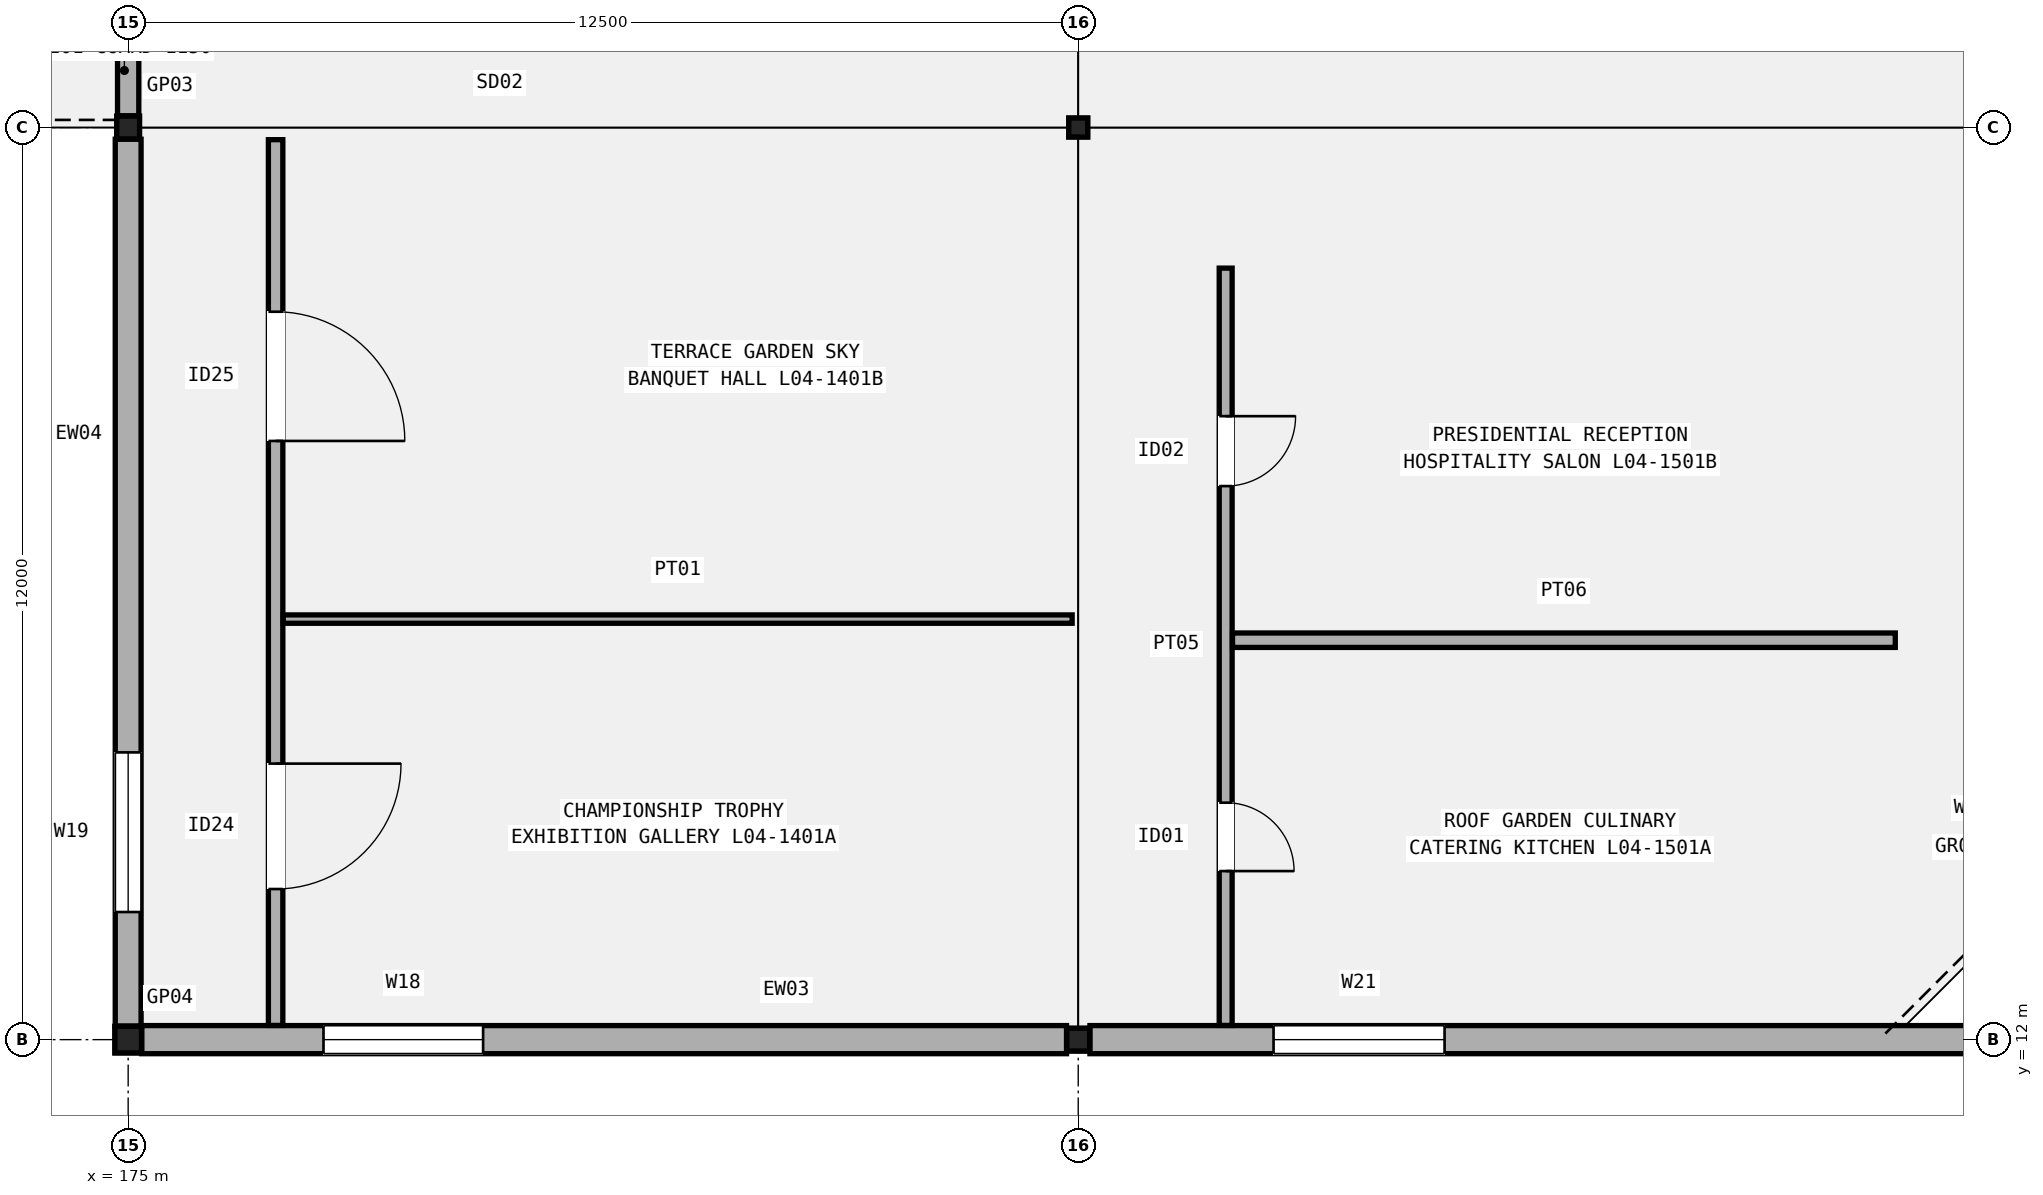
"""IFC4 building model, lengths in metres.
Left out: names, types, materials, properties, quantities, classifications, styles, units other than length and angle.
Written with IfcOpenShell. Run it as: python <this file> out.ifc"""

import sys

from ifc_helpers import new_model, si_unit, direction, frame, frame_2d, origin, origin_2d, place, context, subcontext, project, spatial, rectangle, hollow_rectangle, extrude, element, fill, save


model = new_model("IFC4")
c1 = context("Model", 3, precision=1e-05, world=origin(), true_north=direction((0.0, 1.0)))
c2 = subcontext(c1, "Body", "Model", "MODEL_VIEW")
j1 = project(units=[si_unit("LENGTHUNIT", "METRE"), si_unit("PLANEANGLEUNIT", "RADIAN")], contexts=[c1])
p1 = place(None, origin())
s1 = spatial("IfcSite", under=j1, at=p1, CompositionType="ELEMENT")
p2 = place(p1, origin())
s2 = spatial("IfcBuilding", under=s1, at=p2, CompositionType="ELEMENT")
p3 = place(p2, frame((0.0, 0.0, 20.4)))
s3 = spatial("IfcBuildingStorey", under=s2, at=p3, CompositionType="ELEMENT", Elevation=20.4)
p4 = place(p3, frame((175.0, 12.0, 0.0), z_axis=(0.0, 0.0, 1.0), x_axis=(1.0, 0.0, 0.0)))
e1 = element("IfcColumn", 1, at=p4, inside=s3, PredefinedType="COLUMN", context=c2, shape_type="SweptSolid", body=[
    extrude(hollow_rectangle(XDim=0.35, YDim=0.35, WallThickness=0.016, InnerFilletRadius=0.016, OuterFilletRadius=0.032, at=origin_2d()), origin(), (0.0, 0.0, 1.0), 5.4),
])
for number, where, z_axis, x_axis in (
    (2, (175.0, 24.0, 0.0), (0.0, 0.0, 1.0), (1.0, 0.0, 0.0)),
    (3, (187.5, 12.0, 0.0), (0.0, 0.0, 1.0), (1.0, 0.0, 0.0)),
):
    element("IfcColumn", number, at=place(p3, frame(where, z_axis=z_axis, x_axis=x_axis)), inside=s3, PredefinedType="COLUMN", context=c2, shape_type="SweptSolid", body=[
        extrude(hollow_rectangle(XDim=0.3, YDim=0.3, WallThickness=0.012, InnerFilletRadius=0.012, OuterFilletRadius=0.024, at=origin_2d()), origin(), (0.0, 0.0, 1.0), 5.4),
    ])
p5 = place(p3, frame((187.5, 24.0, 0.0), z_axis=(0.0, 0.0, 1.0), x_axis=(1.0, 0.0, 0.0)))
e4 = element("IfcColumn", 4, at=p5, inside=s3, PredefinedType="COLUMN", context=c2, shape_type="SweptSolid", body=[
    extrude(hollow_rectangle(XDim=0.25, YDim=0.25, WallThickness=0.012, InnerFilletRadius=0.012, OuterFilletRadius=0.024, at=origin_2d()), origin(), (0.0, 0.0, 1.0), 5.4),
])
p6 = place(p3, frame((175.179, 12.0, 0.0), z_axis=(0.0, 0.0, 1.0), x_axis=(1.0, 0.0, 0.0)))
e5 = element("IfcWall", 5, at=p6, inside=s3, PredefinedType="SOLIDWALL", context=c2, shape_type="SweptSolid", body=[
    extrude(rectangle(XDim=12.167, YDim=0.37, at=frame_2d((6.083, 0.0))), origin(), (0.0, 0.0, 1.0), 4.48),
])
p7 = place(p6, frame((2.391, 0.0, 0.95)))
e6 = element("IfcOpeningElement", 6, at=p7, cuts=e5, PredefinedType="OPENING", context=c2, shape_type="SweptSolid", body=[
    extrude(rectangle(XDim=2.1, YDim=1.85, at=frame_2d((1.05, 0.925))), frame((0.0, 0.195, 0.0), z_axis=(0.0, -1.0, 0.0), x_axis=(1.0, 0.0, 0.0)), (0.0, 0.0, 1.0), 0.39),
])
p8 = place(p3, frame((175.0, 12.179, 0.0), z_axis=(0.0, 0.0, 1.0), x_axis=(0.0, 1.0, 0.0)))
e7 = element("IfcWall", 7, at=p8, inside=s3, PredefinedType="SOLIDWALL", context=c2, shape_type="SweptSolid", body=[
    extrude(rectangle(XDim=11.667, YDim=0.34, at=frame_2d((5.833, 0.0))), origin(), (0.0, 0.0, 1.0), 4.48),
])
p9 = place(p8, frame((1.5, 0.0, 0.95)))
e8 = element("IfcOpeningElement", 8, at=p9, cuts=e7, PredefinedType="OPENING", context=c2, shape_type="SweptSolid", body=[
    extrude(rectangle(XDim=2.1, YDim=2.25, at=frame_2d((1.05, 1.125))), frame((0.0, 0.18, 0.0), z_axis=(0.0, -1.0, 0.0), x_axis=(1.0, 0.0, 0.0)), (0.0, 0.0, 1.0), 0.36),
])
p10 = place(p3, frame((175.0, 24.154, 0.0), z_axis=(0.0, 0.0, 1.0), x_axis=(0.0, 1.0, 0.0)))
e9 = element("IfcWall", 9, at=p10, inside=s3, PredefinedType="SOLIDWALL", context=c2, shape_type="SweptSolid", body=[
    extrude(rectangle(XDim=11.717, YDim=0.28, at=frame_2d((5.858, 0.0))), origin(), (0.0, 0.0, 1.0), 4.58),
])
p11 = place(p10, frame((3.366, 0.0, 0.0)))
e10 = element("IfcOpeningElement", 10, at=p11, cuts=e9, PredefinedType="OPENING", context=c2, shape_type="SweptSolid", body=[
    extrude(rectangle(XDim=2.1, YDim=2.35, at=frame_2d((1.05, 1.175))), frame((0.0, 0.15, 0.0), z_axis=(0.0, -1.0, 0.0), x_axis=(1.0, 0.0, 0.0)), (0.0, 0.0, 1.0), 0.3),
])
p12 = place(p3, frame((187.654, 12.0, 0.0), z_axis=(0.0, 0.0, 1.0), x_axis=(1.0, 0.0, 0.0)))
e11 = element("IfcWall", 11, at=p12, inside=s3, PredefinedType="SOLIDWALL", context=c2, shape_type="SweptSolid", body=[
    extrude(rectangle(XDim=12.217, YDim=0.37, at=frame_2d((6.108, 0.0))), origin(), (0.0, 0.0, 1.0), 4.58),
])
p13 = place(p12, frame((2.416, 0.0, 0.95)))
e12 = element("IfcOpeningElement", 12, at=p13, cuts=e11, PredefinedType="OPENING", context=c2, shape_type="SweptSolid", body=[
    extrude(rectangle(XDim=2.25, YDim=1.8, at=frame_2d((1.125, 0.9))), frame((0.0, 0.195, 0.0), z_axis=(0.0, -1.0, 0.0), x_axis=(1.0, 0.0, 0.0)), (0.0, 0.0, 1.0), 0.39),
])
p14 = place(p3, frame((176.94, 12.187, 0.0), z_axis=(0.0, 0.0, 1.0), x_axis=(0.0, 1.0, 0.0)))
e13 = element("IfcWall", 13, at=p14, inside=s3, PredefinedType="PARTITIONING", context=c2, shape_type="SweptSolid", body=[
    extrude(rectangle(XDim=11.653, YDim=0.19, at=frame_2d((5.827, 0.0))), origin(), (0.0, 0.0, 1.0), 4.52),
])
p15 = place(p14, frame((3.444, 0.0, 0.0), z_axis=(0.0, 0.0, 1.0), x_axis=(-1.0, 0.0, 0.0)))
e14 = element("IfcOpeningElement", 14, at=p15, cuts=e13, PredefinedType="OPENING", context=c2, shape_type="SweptSolid", body=[
    extrude(rectangle(XDim=1.65, YDim=2.28, at=frame_2d((0.825, 1.14))), frame((0.0, 0.105, 0.0), z_axis=(0.0, -1.0, 0.0), x_axis=(1.0, 0.0, 0.0)), (0.0, 0.0, 1.0), 0.21),
])
p16 = place(p14, frame((9.389, 0.0, 0.0), z_axis=(0.0, 0.0, 1.0), x_axis=(-1.0, 0.0, 0.0)))
e15 = element("IfcOpeningElement", 15, at=p16, cuts=e13, PredefinedType="OPENING", context=c2, shape_type="SweptSolid", body=[
    extrude(rectangle(XDim=1.7, YDim=2.32, at=frame_2d((0.85, 1.16))), frame((0.0, 0.105, 0.0), z_axis=(0.0, -1.0, 0.0), x_axis=(1.0, 0.0, 0.0)), (0.0, 0.0, 1.0), 0.21),
])
p17 = place(p3, frame((177.04, 17.533, 0.0), z_axis=(0.0, 0.0, 1.0), x_axis=(1.0, 0.0, 0.0)))
e16 = element("IfcWall", 16, at=p17, inside=s3, PredefinedType="PARTITIONING", context=c2, shape_type="SweptSolid", body=[
    extrude(rectangle(XDim=10.38, YDim=0.11, at=frame_2d((5.19, 0.0))), origin(), (0.0, 0.0, 1.0), 4.52),
])
p18 = place(p3, frame((189.44, 12.187, 0.0), z_axis=(0.0, 0.0, 1.0), x_axis=(0.0, 1.0, 0.0)))
e17 = element("IfcWall", 17, at=p18, inside=s3, PredefinedType="PARTITIONING", context=c2, shape_type="SweptSolid", body=[
    extrude(rectangle(XDim=9.963, YDim=0.17, at=frame_2d((4.981, 0.0))), origin(), (0.0, 0.0, 1.0), 4.52),
])
p19 = place(p18, frame((2.93, 0.0, 0.0), z_axis=(0.0, 0.0, 1.0), x_axis=(-1.0, 0.0, 0.0)))
e18 = element("IfcOpeningElement", 18, at=p19, cuts=e17, PredefinedType="OPENING", context=c2, shape_type="SweptSolid", body=[
    extrude(rectangle(XDim=0.9, YDim=2.06, at=frame_2d((0.45, 1.03))), frame((0.0, 0.095, 0.0), z_axis=(0.0, -1.0, 0.0), x_axis=(1.0, 0.0, 0.0)), (0.0, 0.0, 1.0), 0.19),
])
p20 = place(p18, frame((8.015, 0.0, 0.0), z_axis=(0.0, 0.0, 1.0), x_axis=(-1.0, 0.0, 0.0)))
e19 = element("IfcOpeningElement", 19, at=p20, cuts=e17, PredefinedType="OPENING", context=c2, shape_type="SweptSolid", body=[
    extrude(rectangle(XDim=0.92, YDim=2.1, at=frame_2d((0.46, 1.05))), frame((0.0, 0.095, 0.0), z_axis=(0.0, -1.0, 0.0), x_axis=(1.0, 0.0, 0.0)), (0.0, 0.0, 1.0), 0.19),
])
p21 = place(p3, frame((189.53, 17.255, 0.0), z_axis=(0.0, 0.0, 1.0), x_axis=(1.0, 0.0, 0.0)))
e20 = element("IfcWall", 20, at=p21, inside=s3, PredefinedType="PARTITIONING", context=c2, shape_type="SweptSolid", body=[
    extrude(rectangle(XDim=8.72, YDim=0.19, at=frame_2d((4.36, 0.0))), origin(), (0.0, 0.0, 1.0), 4.52),
])
p22 = place(p7, origin())
e21 = element("IfcWindow", 21, at=p22, inside=s3, PartitioningType="SINGLE_PANEL", PredefinedType="WINDOW", context=c2, shape_type="SweptSolid", body=[
    extrude(rectangle(XDim=2.1, YDim=1.85, at=frame_2d((1.05, 0.925))), frame((0.0, 0.03, 0.0), z_axis=(0.0, -1.0, 0.0), x_axis=(1.0, 0.0, 0.0)), (0.0, 0.0, 1.0), 0.06),
])
fill(e6, e21)
p23 = place(p9, origin())
e22 = element("IfcWindow", 22, at=p23, inside=s3, PartitioningType="SINGLE_PANEL", PredefinedType="WINDOW", context=c2, shape_type="SweptSolid", body=[
    extrude(rectangle(XDim=2.1, YDim=2.25, at=frame_2d((1.05, 1.125))), frame((0.0, 0.03, 0.0), z_axis=(0.0, -1.0, 0.0), x_axis=(1.0, 0.0, 0.0)), (0.0, 0.0, 1.0), 0.06),
])
fill(e8, e22)
p24 = place(p13, origin())
e23 = element("IfcWindow", 23, at=p24, inside=s3, PartitioningType="SINGLE_PANEL", PredefinedType="WINDOW", context=c2, shape_type="SweptSolid", body=[
    extrude(rectangle(XDim=2.25, YDim=1.8, at=frame_2d((1.125, 0.9))), frame((0.0, 0.03, 0.0), z_axis=(0.0, -1.0, 0.0), x_axis=(1.0, 0.0, 0.0)), (0.0, 0.0, 1.0), 0.06),
])
fill(e12, e23)
p25 = place(p15, origin())
e24 = element("IfcDoor", 24, at=p25, inside=s3, OperationType="SINGLE_SWING_LEFT", PredefinedType="DOOR", context=c2, shape_type="SweptSolid", body=[
    extrude(rectangle(XDim=1.65, YDim=2.28, at=frame_2d((0.825, 1.14))), frame((0.0, 0.025, 0.0), z_axis=(0.0, -1.0, 0.0), x_axis=(1.0, 0.0, 0.0)), (0.0, 0.0, 1.0), 0.05),
])
fill(e14, e24)
p26 = place(p16, origin())
e25 = element("IfcDoor", 25, at=p26, inside=s3, OperationType="SINGLE_SWING_RIGHT", PredefinedType="DOOR", context=c2, shape_type="SweptSolid", body=[
    extrude(rectangle(XDim=1.7, YDim=2.32, at=frame_2d((0.85, 1.16))), frame((0.0, 0.025, 0.0), z_axis=(0.0, -1.0, 0.0), x_axis=(1.0, 0.0, 0.0)), (0.0, 0.0, 1.0), 0.05),
])
fill(e15, e25)
p27 = place(p19, origin())
e26 = element("IfcDoor", 26, at=p27, inside=s3, OperationType="SINGLE_SWING_RIGHT", PredefinedType="DOOR", context=c2, shape_type="SweptSolid", body=[
    extrude(rectangle(XDim=0.9, YDim=2.06, at=frame_2d((0.45, 1.03))), frame((0.0, 0.025, 0.0), z_axis=(0.0, -1.0, 0.0), x_axis=(1.0, 0.0, 0.0)), (0.0, 0.0, 1.0), 0.05),
])
fill(e18, e26)
p28 = place(p20, origin())
e27 = element("IfcDoor", 27, at=p28, inside=s3, OperationType="SINGLE_SWING_LEFT", PredefinedType="DOOR", context=c2, shape_type="SweptSolid", body=[
    extrude(rectangle(XDim=0.92, YDim=2.1, at=frame_2d((0.46, 1.05))), frame((0.0, 0.025, 0.0), z_axis=(0.0, -1.0, 0.0), x_axis=(1.0, 0.0, 0.0)), (0.0, 0.0, 1.0), 0.05),
])
fill(e19, e27)
save(model, sys.argv[1])
